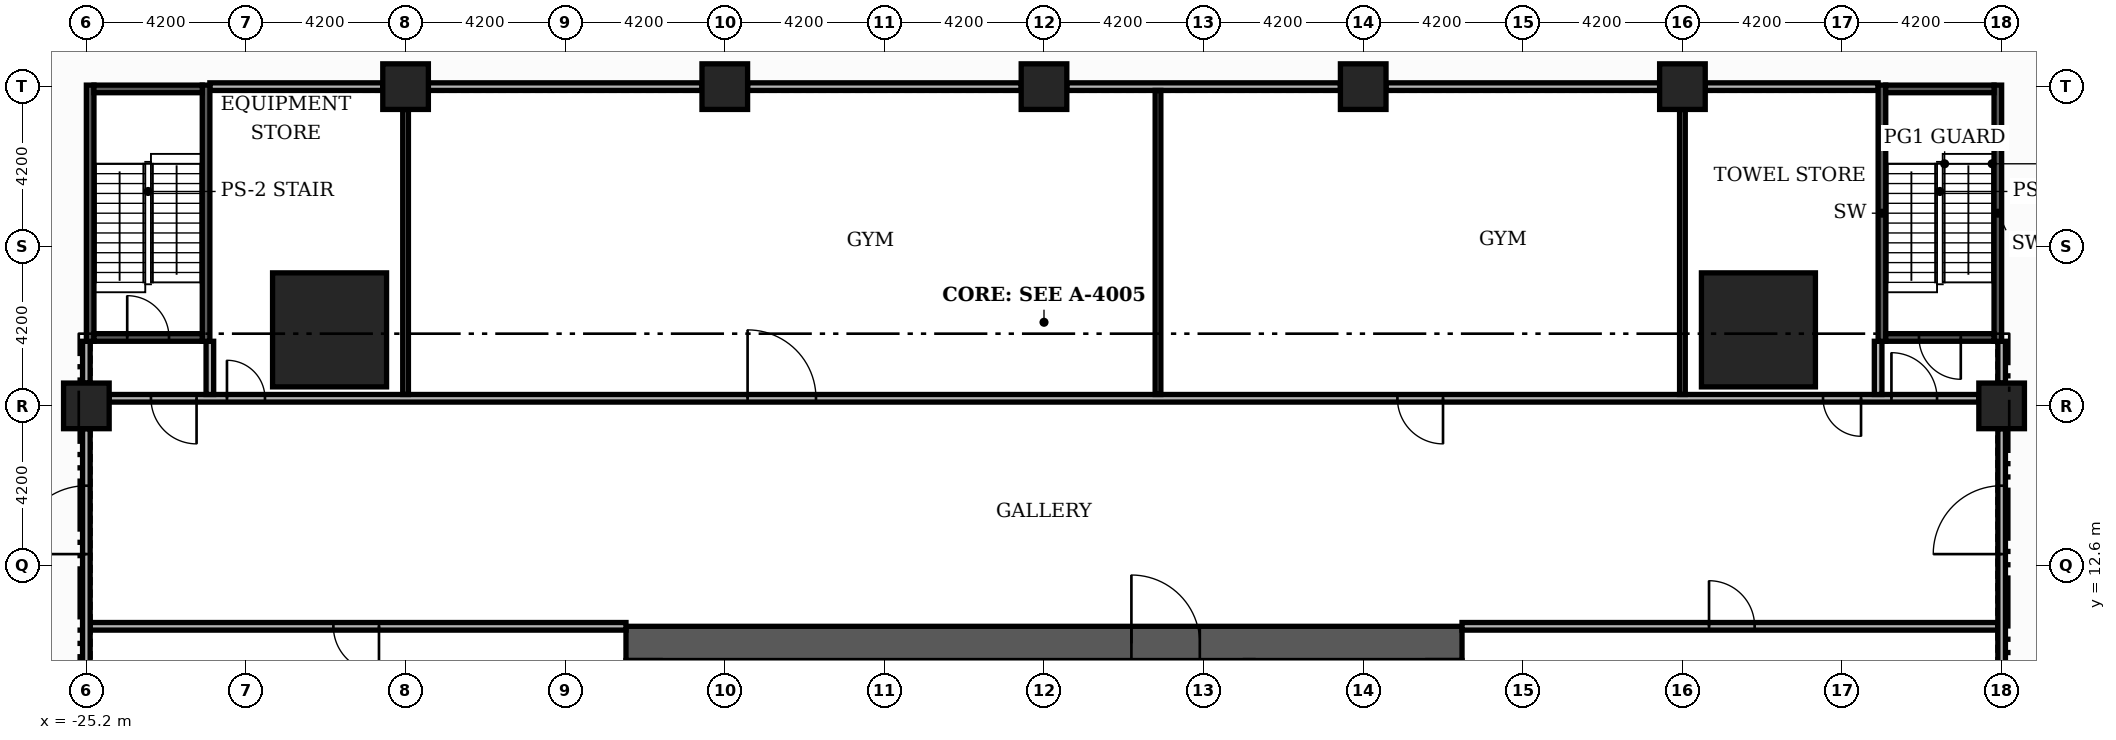
"""IFC4 building model, lengths in metres.
Left out: names, types, materials, properties, quantities, classifications, styles, units other than length and angle.
Written with IfcOpenShell. Run it as: python <this file> out.ifc"""

import sys

from ifc_helpers import new_model, si_unit, direction, frame, frame_2d, origin, origin_2d, place, context, subcontext, project, spatial, rectangle, extrude, element, fill, save


model = new_model("IFC4")
c1 = context("Model", 3, precision=1e-05, world=origin(), true_north=direction((0.0, 1.0)))
c2 = subcontext(c1, "Body", "Model", "MODEL_VIEW")
j1 = project(units=[si_unit("LENGTHUNIT", "METRE"), si_unit("PLANEANGLEUNIT", "RADIAN")], contexts=[c1])
p1 = place(None, origin())
s1 = spatial("IfcSite", under=j1, at=p1, CompositionType="ELEMENT")
p2 = place(p1, origin())
s2 = spatial("IfcBuilding", under=s1, at=p2, CompositionType="ELEMENT")
p3 = place(p2, frame((0.0, 0.0, 12.0)))
s3 = spatial("IfcBuildingStorey", under=s2, at=p3, CompositionType="ELEMENT", Elevation=12.0)
p4 = place(p3, frame((-11.0, 10.55, 0.0), z_axis=(0.0, 0.0, 1.0), x_axis=(1.0, 0.0, 0.0)))
e1 = element("IfcWall", 1, at=p4, inside=s3, PredefinedType="SHEAR", context=c2, shape_type="SweptSolid", body=[
    extrude(rectangle(XDim=22.0, YDim=0.9, at=frame_2d((11.0, 0.0))), origin(), (0.0, 0.0, 1.0), 4.38),
])
p5 = place(p4, frame((13.3, 0.0, 0.0)))
e2 = element("IfcOpeningElement", 2, at=p5, cuts=e1, PredefinedType="OPENING", context=c2, shape_type="SweptSolid", body=[
    extrude(rectangle(XDim=1.8, YDim=2.2, at=frame_2d((0.9, 1.1))), frame((0.0, 0.46, 0.0), z_axis=(0.0, -1.0, 0.0), x_axis=(1.0, 0.0, 0.0)), (0.0, 0.0, 1.0), 0.92),
])
for number, where, z_axis, x_axis in (
    (3, (18.8, 18.8, 0.0), (0.0, 0.0, 1.0), (1.0, 0.0, 0.0)),
    (4, (-18.8, 18.8, 0.0), (0.0, 0.0, 1.0), (1.0, 0.0, 0.0)),
):
    element("IfcColumn", number, at=place(p3, frame(where, z_axis=z_axis, x_axis=x_axis)), inside=s3, PredefinedType="COLUMN", context=c2, shape_type="SweptSolid", body=[
        extrude(rectangle(XDim=3.0, YDim=3.0, at=origin_2d()), origin(), (0.0, 0.0, 1.0), 4.8),
    ])
for number, where, z_axis, x_axis in (
    (5, (25.2, 16.8, 0.0), (0.0, 0.0, 1.0), (1.0, 0.0, 0.0)),
    (6, (0.0, 25.2, 0.0), (0.0, 0.0, 1.0), (1.0, 0.0, 0.0)),
    (7, (-8.4, 25.2, 0.0), (0.0, 0.0, 1.0), (1.0, 0.0, 0.0)),
    (8, (-16.8, 25.2, 0.0), (0.0, 0.0, 1.0), (1.0, 0.0, 0.0)),
    (9, (8.4, 25.2, 0.0), (0.0, 0.0, 1.0), (1.0, 0.0, 0.0)),
    (10, (16.8, 25.2, 0.0), (0.0, 0.0, 1.0), (1.0, 0.0, 0.0)),
    (11, (-25.2, 16.8, 0.0), (0.0, 0.0, 1.0), (1.0, 0.0, 0.0)),
):
    element("IfcColumn", number, at=place(p3, frame(where, z_axis=z_axis, x_axis=x_axis)), inside=s3, PredefinedType="COLUMN", context=c2, shape_type="SweptSolid", body=[
        extrude(rectangle(XDim=1.2, YDim=1.2, at=origin_2d()), origin(), (0.0, 0.0, 1.0), 4.8),
    ])
p6 = place(p3, frame((-25.1, 11.0, 0.0), z_axis=(0.0, 0.0, 1.0), x_axis=(1.0, 0.0, 0.0)))
e12 = element("IfcWall", 12, at=p6, inside=s3, PredefinedType="PARTITIONING", context=c2, shape_type="SweptSolid", body=[
    extrude(rectangle(XDim=14.1, YDim=0.2, at=frame_2d((7.05, 0.0))), origin(), (0.0, 0.0, 1.0), 4.38),
])
p7 = place(p6, frame((6.4, 0.0, 0.0)))
e13 = element("IfcOpeningElement", 13, at=p7, cuts=e12, PredefinedType="OPENING", context=c2, shape_type="SweptSolid", body=[
    extrude(rectangle(XDim=1.2, YDim=2.2, at=frame_2d((0.6, 1.1))), frame((0.0, 0.11, 0.0), z_axis=(0.0, -1.0, 0.0), x_axis=(1.0, 0.0, 0.0)), (0.0, 0.0, 1.0), 0.22),
])
p8 = place(p3, frame((11.0, 11.0, 0.0), z_axis=(0.0, 0.0, 1.0), x_axis=(1.0, 0.0, 0.0)))
e14 = element("IfcWall", 14, at=p8, inside=s3, PredefinedType="PARTITIONING", context=c2, shape_type="SweptSolid", body=[
    extrude(rectangle(XDim=14.1, YDim=0.2, at=frame_2d((7.05, 0.0))), origin(), (0.0, 0.0, 1.0), 4.38),
])
p9 = place(p8, frame((6.5, 0.0, 0.0)))
e15 = element("IfcOpeningElement", 15, at=p9, cuts=e14, PredefinedType="OPENING", context=c2, shape_type="SweptSolid", body=[
    extrude(rectangle(XDim=1.2, YDim=2.2, at=frame_2d((0.6, 1.1))), frame((0.0, 0.11, 0.0), z_axis=(0.0, -1.0, 0.0), x_axis=(1.0, 0.0, 0.0)), (0.0, 0.0, 1.0), 0.22),
])
p10 = place(p3, frame((-24.6, 17.0, 0.0), z_axis=(0.0, 0.0, 1.0), x_axis=(1.0, 0.0, 0.0)))
e16 = element("IfcWall", 16, at=p10, inside=s3, PredefinedType="PARTITIONING", context=c2, shape_type="SweptSolid", body=[
    extrude(rectangle(XDim=49.2, YDim=0.2, at=frame_2d((24.6, 0.0))), origin(), (0.0, 0.0, 1.0), 4.38),
])
p11 = place(p10, frame((1.1, 0.0, 0.0)))
e17 = element("IfcOpeningElement", 17, at=p11, cuts=e16, PredefinedType="OPENING", context=c2, shape_type="SweptSolid", body=[
    extrude(rectangle(XDim=1.2, YDim=2.2, at=frame_2d((0.6, 1.1))), frame((0.0, 0.11, 0.0), z_axis=(0.0, -1.0, 0.0), x_axis=(1.0, 0.0, 0.0)), (0.0, 0.0, 1.0), 0.22),
])
p12 = place(p10, frame((3.1, 0.0, 0.0)))
e18 = element("IfcOpeningElement", 18, at=p12, cuts=e16, PredefinedType="OPENING", context=c2, shape_type="SweptSolid", body=[
    extrude(rectangle(XDim=1.0, YDim=2.1, at=frame_2d((0.5, 1.05))), frame((0.0, 0.11, 0.0), z_axis=(0.0, -1.0, 0.0), x_axis=(1.0, 0.0, 0.0)), (0.0, 0.0, 1.0), 0.22),
])
p13 = place(p10, frame((16.8, 0.0, 0.0)))
e19 = element("IfcOpeningElement", 19, at=p13, cuts=e16, PredefinedType="OPENING", context=c2, shape_type="SweptSolid", body=[
    extrude(rectangle(XDim=1.8, YDim=2.2, at=frame_2d((0.9, 1.1))), frame((0.0, 0.11, 0.0), z_axis=(0.0, -1.0, 0.0), x_axis=(1.0, 0.0, 0.0)), (0.0, 0.0, 1.0), 0.22),
])
p14 = place(p10, frame((33.9, 0.0, 0.0)))
e20 = element("IfcOpeningElement", 20, at=p14, cuts=e16, PredefinedType="OPENING", context=c2, shape_type="SweptSolid", body=[
    extrude(rectangle(XDim=1.2, YDim=2.2, at=frame_2d((0.6, 1.1))), frame((0.0, 0.11, 0.0), z_axis=(0.0, -1.0, 0.0), x_axis=(1.0, 0.0, 0.0)), (0.0, 0.0, 1.0), 0.22),
])
p15 = place(p10, frame((45.1, 0.0, 0.0)))
e21 = element("IfcOpeningElement", 21, at=p15, cuts=e16, PredefinedType="OPENING", context=c2, shape_type="SweptSolid", body=[
    extrude(rectangle(XDim=1.0, YDim=2.1, at=frame_2d((0.5, 1.05))), frame((0.0, 0.11, 0.0), z_axis=(0.0, -1.0, 0.0), x_axis=(1.0, 0.0, 0.0)), (0.0, 0.0, 1.0), 0.22),
])
p16 = place(p10, frame((46.9, 0.0, 0.0)))
e22 = element("IfcOpeningElement", 22, at=p16, cuts=e16, PredefinedType="OPENING", context=c2, shape_type="SweptSolid", body=[
    extrude(rectangle(XDim=1.2, YDim=2.2, at=frame_2d((0.6, 1.1))), frame((0.0, 0.11, 0.0), z_axis=(0.0, -1.0, 0.0), x_axis=(1.0, 0.0, 0.0)), (0.0, 0.0, 1.0), 0.22),
])
p17 = place(p3, frame((-21.95, 25.2, 0.0), z_axis=(0.0, 0.0, 1.0), x_axis=(1.0, 0.0, 0.0)))
e23 = element("IfcWall", 23, at=p17, inside=s3, PredefinedType="PARTITIONING", context=c2, shape_type="SweptSolid", body=[
    extrude(rectangle(XDim=4.55, YDim=0.2, at=frame_2d((2.275, 0.0))), origin(), (0.0, 0.0, 1.0), 4.18),
])
for number, where, z_axis, x_axis in (
    (24, (-16.2, 25.2, 0.0), (0.0, 0.0, 1.0), (1.0, 0.0, 0.0)),
    (25, (-7.8, 25.2, 0.0), (0.0, 0.0, 1.0), (1.0, 0.0, 0.0)),
    (26, (0.6, 25.2, 0.0), (0.0, 0.0, 1.0), (1.0, 0.0, 0.0)),
    (27, (9.0, 25.2, 0.0), (0.0, 0.0, 1.0), (1.0, 0.0, 0.0)),
):
    element("IfcWall", number, at=place(p3, frame(where, z_axis=z_axis, x_axis=x_axis)), inside=s3, PredefinedType="PARTITIONING", context=c2, shape_type="SweptSolid", body=[
        extrude(rectangle(XDim=7.2, YDim=0.2, at=frame_2d((3.6, 0.0))), origin(), (0.0, 0.0, 1.0), 4.18),
    ])
p18 = place(p3, frame((17.4, 25.2, 0.0), z_axis=(0.0, 0.0, 1.0), x_axis=(1.0, 0.0, 0.0)))
e28 = element("IfcWall", 28, at=p18, inside=s3, PredefinedType="PARTITIONING", context=c2, shape_type="SweptSolid", body=[
    extrude(rectangle(XDim=4.55, YDim=0.2, at=frame_2d((2.275, 0.0))), origin(), (0.0, 0.0, 1.0), 4.18),
])
p19 = place(p3, frame((-25.2, 9.0, 0.0), z_axis=(0.0, 0.0, 1.0), x_axis=(0.0, 1.0, 0.0)))
e29 = element("IfcWall", 29, at=p19, inside=s3, PredefinedType="PARTITIONING", context=c2, shape_type="SweptSolid", body=[
    extrude(rectangle(XDim=7.2, YDim=0.2, at=frame_2d((3.6, 0.0))), origin(), (0.0, 0.0, 1.0), 4.08),
])
p20 = place(p19, frame((3.9, 0.0, 0.0)))
e30 = element("IfcOpeningElement", 30, at=p20, cuts=e29, PredefinedType="OPENING", context=c2, shape_type="SweptSolid", body=[
    extrude(rectangle(XDim=1.8, YDim=2.2, at=frame_2d((0.9, 1.1))), frame((0.0, 0.11, 0.0), z_axis=(0.0, -1.0, 0.0), x_axis=(1.0, 0.0, 0.0)), (0.0, 0.0, 1.0), 0.22),
])
p21 = place(p3, frame((-25.2, 17.4, 0.0), z_axis=(0.0, 0.0, 1.0), x_axis=(0.0, 1.0, 0.0)))
e31 = element("IfcWall", 31, at=p21, inside=s3, PredefinedType="PARTITIONING", context=c2, shape_type="SweptSolid", body=[
    extrude(rectangle(XDim=1.1, YDim=0.2, at=frame_2d((0.55, 0.0))), origin(), (0.0, 0.0, 1.0), 4.08),
])
p22 = place(p3, frame((-21.95, 17.1, 0.0), z_axis=(0.0, 0.0, 1.0), x_axis=(0.0, 1.0, 0.0)))
e32 = element("IfcWall", 32, at=p22, inside=s3, PredefinedType="PARTITIONING", context=c2, shape_type="SweptSolid", body=[
    extrude(rectangle(XDim=1.4, YDim=0.2, at=frame_2d((0.7, 0.0))), origin(), (0.0, 0.0, 1.0), 4.38),
])
p23 = place(p3, frame((-16.8, 17.1, 0.0), z_axis=(0.0, 0.0, 1.0), x_axis=(0.0, 1.0, 0.0)))
e33 = element("IfcWall", 33, at=p23, inside=s3, PredefinedType="PARTITIONING", context=c2, shape_type="SweptSolid", body=[
    extrude(rectangle(XDim=7.5, YDim=0.15, at=frame_2d((3.75, 0.0))), origin(), (0.0, 0.0, 1.0), 4.38),
])
p24 = place(p3, frame((3.0, 17.1, 0.0), z_axis=(0.0, 0.0, 1.0), x_axis=(0.0, 1.0, 0.0)))
e34 = element("IfcWall", 34, at=p24, inside=s3, PredefinedType="PARTITIONING", context=c2, shape_type="SweptSolid", body=[
    extrude(rectangle(XDim=8.0, YDim=0.15, at=frame_2d((4.0, 0.0))), origin(), (0.0, 0.0, 1.0), 4.38),
])
p25 = place(p3, frame((16.8, 17.1, 0.0), z_axis=(0.0, 0.0, 1.0), x_axis=(0.0, 1.0, 0.0)))
e35 = element("IfcWall", 35, at=p25, inside=s3, PredefinedType="PARTITIONING", context=c2, shape_type="SweptSolid", body=[
    extrude(rectangle(XDim=7.5, YDim=0.15, at=frame_2d((3.75, 0.0))), origin(), (0.0, 0.0, 1.0), 4.38),
])
p26 = place(p3, frame((21.95, 17.1, 0.0), z_axis=(0.0, 0.0, 1.0), x_axis=(0.0, 1.0, 0.0)))
e36 = element("IfcWall", 36, at=p26, inside=s3, PredefinedType="PARTITIONING", context=c2, shape_type="SweptSolid", body=[
    extrude(rectangle(XDim=1.4, YDim=0.2, at=frame_2d((0.7, 0.0))), origin(), (0.0, 0.0, 1.0), 4.38),
])
p27 = place(p3, frame((25.2, 9.0, 0.0), z_axis=(0.0, 0.0, 1.0), x_axis=(0.0, 1.0, 0.0)))
e37 = element("IfcWall", 37, at=p27, inside=s3, PredefinedType="PARTITIONING", context=c2, shape_type="SweptSolid", body=[
    extrude(rectangle(XDim=7.2, YDim=0.2, at=frame_2d((3.6, 0.0))), origin(), (0.0, 0.0, 1.0), 4.08),
])
p28 = place(p27, frame((3.9, 0.0, 0.0)))
e38 = element("IfcOpeningElement", 38, at=p28, cuts=e37, PredefinedType="OPENING", context=c2, shape_type="SweptSolid", body=[
    extrude(rectangle(XDim=1.8, YDim=2.2, at=frame_2d((0.9, 1.1))), frame((0.0, 0.11, 0.0), z_axis=(0.0, -1.0, 0.0), x_axis=(1.0, 0.0, 0.0)), (0.0, 0.0, 1.0), 0.22),
])
p29 = place(p3, frame((25.2, 17.4, 0.0), z_axis=(0.0, 0.0, 1.0), x_axis=(0.0, 1.0, 0.0)))
e39 = element("IfcWall", 39, at=p29, inside=s3, PredefinedType="PARTITIONING", context=c2, shape_type="SweptSolid", body=[
    extrude(rectangle(XDim=1.1, YDim=0.2, at=frame_2d((0.55, 0.0))), origin(), (0.0, 0.0, 1.0), 4.08),
])
p30 = place(p3, frame((22.05, 18.5, 0.0), z_axis=(0.0, 0.0, 1.0), x_axis=(0.0, 1.0, 0.0)))
e40 = element("IfcWall", 40, at=p30, inside=s3, PredefinedType="SOLIDWALL", context=c2, shape_type="SweptSolid", body=[
    extrude(rectangle(XDim=6.74, YDim=0.2, at=frame_2d((3.37, 0.0))), origin(), (0.0, 0.0, 1.0), 4.38),
])
p31 = place(p3, frame((25.1, 18.5, 0.0), z_axis=(0.0, 0.0, 1.0), x_axis=(0.0, 1.0, 0.0)))
e41 = element("IfcWall", 41, at=p31, inside=s3, PredefinedType="SOLIDWALL", context=c2, shape_type="SweptSolid", body=[
    extrude(rectangle(XDim=6.74, YDim=0.2, at=frame_2d((3.37, 0.0))), origin(), (0.0, 0.0, 1.0), 4.08),
])
p32 = place(p3, frame((22.15, 18.6, 0.0), z_axis=(0.0, 0.0, 1.0), x_axis=(1.0, 0.0, 0.0)))
e42 = element("IfcWall", 42, at=p32, inside=s3, PredefinedType="SOLIDWALL", context=c2, shape_type="SweptSolid", body=[
    extrude(rectangle(XDim=2.85, YDim=0.2, at=frame_2d((1.425, 0.0))), origin(), (0.0, 0.0, 1.0), 4.38),
])
p33 = place(p32, frame((0.875, 0.0, 0.0)))
e43 = element("IfcOpeningElement", 43, at=p33, cuts=e42, PredefinedType="OPENING", context=c2, shape_type="SweptSolid", body=[
    extrude(rectangle(XDim=1.1, YDim=2.2, at=frame_2d((0.55, 1.1))), frame((0.0, 0.11, 0.0), z_axis=(0.0, -1.0, 0.0), x_axis=(1.0, 0.0, 0.0)), (0.0, 0.0, 1.0), 0.22),
])
p34 = place(p3, frame((22.15, 25.14, 0.0), z_axis=(0.0, 0.0, 1.0), x_axis=(1.0, 0.0, 0.0)))
e44 = element("IfcWall", 44, at=p34, inside=s3, PredefinedType="SOLIDWALL", context=c2, shape_type="SweptSolid", body=[
    extrude(rectangle(XDim=2.85, YDim=0.2, at=frame_2d((1.425, 0.0))), origin(), (0.0, 0.0, 1.0), 4.18),
])
p35 = place(p3, frame((-25.1, 18.5, 0.0), z_axis=(0.0, 0.0, 1.0), x_axis=(0.0, 1.0, 0.0)))
e45 = element("IfcWall", 45, at=p35, inside=s3, PredefinedType="SOLIDWALL", context=c2, shape_type="SweptSolid", body=[
    extrude(rectangle(XDim=6.74, YDim=0.2, at=frame_2d((3.37, 0.0))), origin(), (0.0, 0.0, 1.0), 4.08),
])
p36 = place(p3, frame((-22.05, 18.5, 0.0), z_axis=(0.0, 0.0, 1.0), x_axis=(0.0, 1.0, 0.0)))
e46 = element("IfcWall", 46, at=p36, inside=s3, PredefinedType="SOLIDWALL", context=c2, shape_type="SweptSolid", body=[
    extrude(rectangle(XDim=6.74, YDim=0.2, at=frame_2d((3.37, 0.0))), origin(), (0.0, 0.0, 1.0), 4.38),
])
p37 = place(p3, frame((-25.0, 18.6, 0.0), z_axis=(0.0, 0.0, 1.0), x_axis=(1.0, 0.0, 0.0)))
e47 = element("IfcWall", 47, at=p37, inside=s3, PredefinedType="SOLIDWALL", context=c2, shape_type="SweptSolid", body=[
    extrude(rectangle(XDim=2.85, YDim=0.2, at=frame_2d((1.425, 0.0))), origin(), (0.0, 0.0, 1.0), 4.38),
])
p38 = place(p37, frame((0.875, 0.0, 0.0)))
e48 = element("IfcOpeningElement", 48, at=p38, cuts=e47, PredefinedType="OPENING", context=c2, shape_type="SweptSolid", body=[
    extrude(rectangle(XDim=1.1, YDim=2.2, at=frame_2d((0.55, 1.1))), frame((0.0, 0.11, 0.0), z_axis=(0.0, -1.0, 0.0), x_axis=(1.0, 0.0, 0.0)), (0.0, 0.0, 1.0), 0.22),
])
p39 = place(p3, frame((-25.0, 25.14, 0.0), z_axis=(0.0, 0.0, 1.0), x_axis=(1.0, 0.0, 0.0)))
e49 = element("IfcWall", 49, at=p39, inside=s3, PredefinedType="SOLIDWALL", context=c2, shape_type="SweptSolid", body=[
    extrude(rectangle(XDim=2.85, YDim=0.2, at=frame_2d((1.425, 0.0))), origin(), (0.0, 0.0, 1.0), 4.18),
])
p40 = place(p5, origin())
e50 = element("IfcDoor", 50, at=p40, inside=s3, OperationType="DOUBLE_DOOR_SINGLE_SWING", PredefinedType="DOOR", context=c2, shape_type="SweptSolid", body=[
    extrude(rectangle(XDim=1.8, YDim=2.2, at=frame_2d((0.9, 1.1))), frame((0.0, 0.025, 0.0), z_axis=(0.0, -1.0, 0.0), x_axis=(1.0, 0.0, 0.0)), (0.0, 0.0, 1.0), 0.05),
])
fill(e2, e50)
p41 = place(p7, origin())
e51 = element("IfcDoor", 51, at=p41, inside=s3, OperationType="SINGLE_SWING_RIGHT", PredefinedType="DOOR", context=c2, shape_type="SweptSolid", body=[
    extrude(rectangle(XDim=1.2, YDim=2.2, at=frame_2d((0.6, 1.1))), frame((0.0, 0.025, 0.0), z_axis=(0.0, -1.0, 0.0), x_axis=(1.0, 0.0, 0.0)), (0.0, 0.0, 1.0), 0.05),
])
fill(e13, e51)
p42 = place(p9, origin())
e52 = element("IfcDoor", 52, at=p42, inside=s3, OperationType="SINGLE_SWING_LEFT", PredefinedType="DOOR", context=c2, shape_type="SweptSolid", body=[
    extrude(rectangle(XDim=1.2, YDim=2.2, at=frame_2d((0.6, 1.1))), frame((0.0, 0.025, 0.0), z_axis=(0.0, -1.0, 0.0), x_axis=(1.0, 0.0, 0.0)), (0.0, 0.0, 1.0), 0.05),
])
fill(e15, e52)
p43 = place(p20, origin())
e53 = element("IfcDoor", 53, at=p43, inside=s3, OperationType="DOUBLE_DOOR_SINGLE_SWING", PredefinedType="DOOR", context=c2, shape_type="SweptSolid", body=[
    extrude(rectangle(XDim=1.8, YDim=2.2, at=frame_2d((0.9, 1.1))), frame((0.0, 0.025, 0.0), z_axis=(0.0, -1.0, 0.0), x_axis=(1.0, 0.0, 0.0)), (0.0, 0.0, 1.0), 0.05),
])
fill(e30, e53)
p44 = place(p28, origin())
e54 = element("IfcDoor", 54, at=p44, inside=s3, OperationType="DOUBLE_DOOR_SINGLE_SWING", PredefinedType="DOOR", context=c2, shape_type="SweptSolid", body=[
    extrude(rectangle(XDim=1.8, YDim=2.2, at=frame_2d((0.9, 1.1))), frame((0.0, 0.025, 0.0), z_axis=(0.0, -1.0, 0.0), x_axis=(1.0, 0.0, 0.0)), (0.0, 0.0, 1.0), 0.05),
])
fill(e38, e54)
p45 = place(p11, origin())
e55 = element("IfcDoor", 55, at=p45, inside=s3, OperationType="SINGLE_SWING_RIGHT", PredefinedType="DOOR", context=c2, shape_type="SweptSolid", body=[
    extrude(rectangle(XDim=1.2, YDim=2.2, at=frame_2d((0.6, 1.1))), frame((0.0, 0.025, 0.0), z_axis=(0.0, -1.0, 0.0), x_axis=(1.0, 0.0, 0.0)), (0.0, 0.0, 1.0), 0.05),
])
fill(e17, e55)
p46 = place(p12, origin())
e56 = element("IfcDoor", 56, at=p46, inside=s3, OperationType="SINGLE_SWING_LEFT", PredefinedType="DOOR", context=c2, shape_type="SweptSolid", body=[
    extrude(rectangle(XDim=1.0, YDim=2.1, at=frame_2d((0.5, 1.05))), frame((0.0, 0.025, 0.0), z_axis=(0.0, -1.0, 0.0), x_axis=(1.0, 0.0, 0.0)), (0.0, 0.0, 1.0), 0.05),
])
fill(e18, e56)
p47 = place(p13, origin())
e57 = element("IfcDoor", 57, at=p47, inside=s3, OperationType="DOUBLE_DOOR_SINGLE_SWING", PredefinedType="DOOR", context=c2, shape_type="SweptSolid", body=[
    extrude(rectangle(XDim=1.8, YDim=2.2, at=frame_2d((0.9, 1.1))), frame((0.0, 0.025, 0.0), z_axis=(0.0, -1.0, 0.0), x_axis=(1.0, 0.0, 0.0)), (0.0, 0.0, 1.0), 0.05),
])
fill(e19, e57)
p48 = place(p14, origin())
e58 = element("IfcDoor", 58, at=p48, inside=s3, OperationType="SINGLE_SWING_RIGHT", PredefinedType="DOOR", context=c2, shape_type="SweptSolid", body=[
    extrude(rectangle(XDim=1.2, YDim=2.2, at=frame_2d((0.6, 1.1))), frame((0.0, 0.025, 0.0), z_axis=(0.0, -1.0, 0.0), x_axis=(1.0, 0.0, 0.0)), (0.0, 0.0, 1.0), 0.05),
])
fill(e20, e58)
p49 = place(p15, origin())
e59 = element("IfcDoor", 59, at=p49, inside=s3, OperationType="SINGLE_SWING_RIGHT", PredefinedType="DOOR", context=c2, shape_type="SweptSolid", body=[
    extrude(rectangle(XDim=1.0, YDim=2.1, at=frame_2d((0.5, 1.05))), frame((0.0, 0.025, 0.0), z_axis=(0.0, -1.0, 0.0), x_axis=(1.0, 0.0, 0.0)), (0.0, 0.0, 1.0), 0.05),
])
fill(e21, e59)
p50 = place(p16, origin())
e60 = element("IfcDoor", 60, at=p50, inside=s3, OperationType="SINGLE_SWING_LEFT", PredefinedType="DOOR", context=c2, shape_type="SweptSolid", body=[
    extrude(rectangle(XDim=1.2, YDim=2.2, at=frame_2d((0.6, 1.1))), frame((0.0, 0.025, 0.0), z_axis=(0.0, -1.0, 0.0), x_axis=(1.0, 0.0, 0.0)), (0.0, 0.0, 1.0), 0.05),
])
fill(e22, e60)
p51 = place(p33, origin())
e61 = element("IfcDoor", 61, at=p51, inside=s3, OperationType="SINGLE_SWING_RIGHT", PredefinedType="DOOR", context=c2, shape_type="SweptSolid", body=[
    extrude(rectangle(XDim=1.1, YDim=2.2, at=frame_2d((0.55, 1.1))), frame((0.0, 0.025, 0.0), z_axis=(0.0, -1.0, 0.0), x_axis=(1.0, 0.0, 0.0)), (0.0, 0.0, 1.0), 0.05),
])
fill(e43, e61)
p52 = place(p38, origin())
e62 = element("IfcDoor", 62, at=p52, inside=s3, OperationType="SINGLE_SWING_LEFT", PredefinedType="DOOR", context=c2, shape_type="SweptSolid", body=[
    extrude(rectangle(XDim=1.1, YDim=2.2, at=frame_2d((0.55, 1.1))), frame((0.0, 0.025, 0.0), z_axis=(0.0, -1.0, 0.0), x_axis=(1.0, 0.0, 0.0)), (0.0, 0.0, 1.0), 0.05),
])
fill(e48, e62)
save(model, sys.argv[1])
